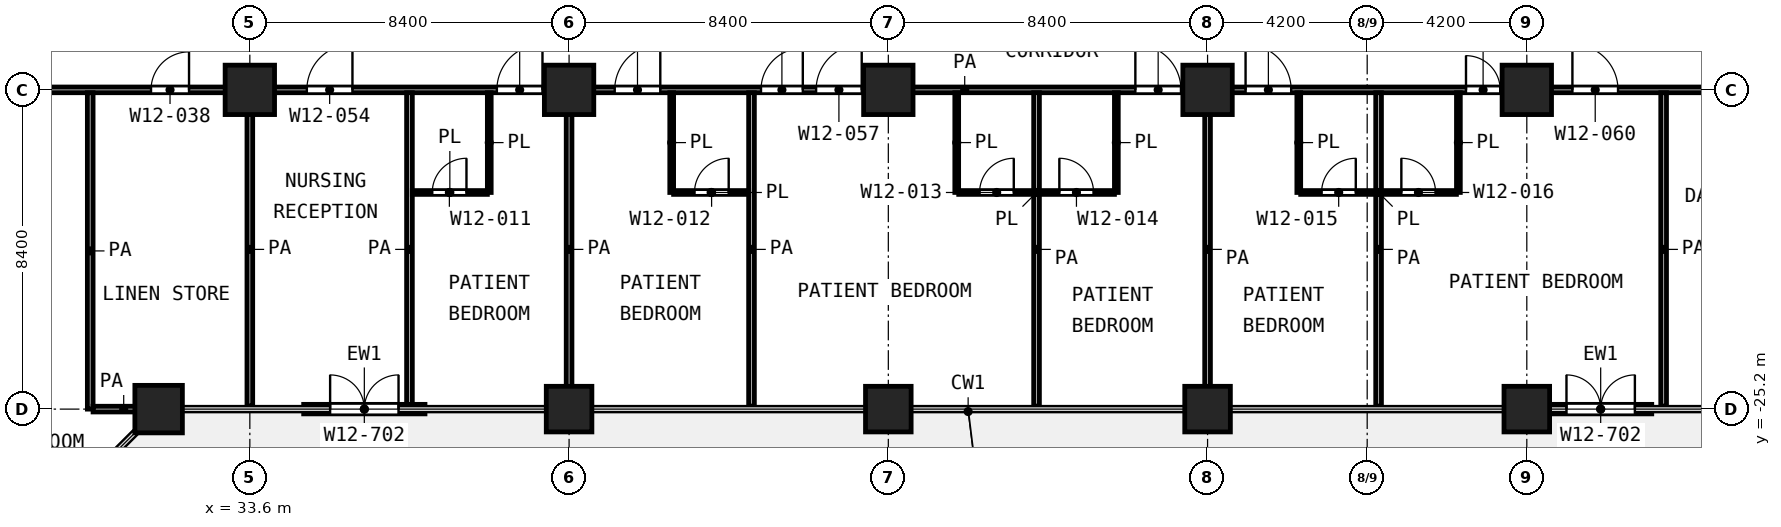
"""IFC4 building model, lengths in metres.
Left out: names, types, materials, properties, quantities, classifications, styles, units other than length and angle.
Written with IfcOpenShell. Run it as: python <this file> out.ifc"""

import sys

from ifc_helpers import new_model, si_unit, direction, frame, frame_2d, origin, origin_2d, place, context, subcontext, project, spatial, rectangle, extrude, element, fill, save


model = new_model("IFC4")
c1 = context("Model", 3, precision=1e-05, world=origin(), true_north=direction((0.0, 1.0)))
c2 = subcontext(c1, "Body", "Model", "MODEL_VIEW")
j1 = project(units=[si_unit("LENGTHUNIT", "METRE"), si_unit("PLANEANGLEUNIT", "RADIAN")], contexts=[c1])
p1 = place(None, origin())
s1 = spatial("IfcSite", under=j1, at=p1, CompositionType="ELEMENT")
p2 = place(p1, origin())
s2 = spatial("IfcBuilding", under=s1, at=p2, CompositionType="ELEMENT")
p3 = place(p2, frame((0.0, 0.0, 77.0)))
s3 = spatial("IfcBuildingStorey", under=s2, at=p3, CompositionType="ELEMENT", Elevation=77.0)
for number, where, z_axis, x_axis in (
    (1, (33.6, -16.8, 0.0), (0.0, 0.0, 1.0), (1.0, 0.0, 0.0)),
    (2, (42.0, -16.8, 0.0), (0.0, 0.0, 1.0), (1.0, 0.0, 0.0)),
    (3, (50.4, -16.8, 0.0), (0.0, 0.0, 1.0), (1.0, 0.0, 0.0)),
    (4, (58.8, -16.8, 0.0), (0.0, 0.0, 1.0), (1.0, 0.0, 0.0)),
    (5, (67.2, -16.8, 0.0), (0.0, 0.0, 1.0), (1.0, 0.0, 0.0)),
):
    element("IfcColumn", number, at=place(p3, frame(where, z_axis=z_axis, x_axis=x_axis)), inside=s3, PredefinedType="COLUMN", context=c2, shape_type="SweptSolid", body=[
        extrude(rectangle(XDim=1.3, YDim=1.3, at=origin_2d()), origin(), (0.0, 0.0, 1.0), 4.2),
    ])
p4 = place(p3, frame((31.2, -25.2, 0.0), z_axis=(0.0, 0.0, 1.0), x_axis=(1.0, 0.0, 0.0)))
e6 = element("IfcColumn", 6, at=p4, inside=s3, PredefinedType="COLUMN", context=c2, shape_type="SweptSolid", body=[
    extrude(rectangle(XDim=1.25, YDim=1.25, at=origin_2d()), origin(), (0.0, 0.0, 1.0), 4.2),
])
for number, where, z_axis, x_axis in (
    (7, (42.0, -25.2, 0.0), (0.0, 0.0, 1.0), (1.0, 0.0, 0.0)),
    (8, (50.4, -25.2, 0.0), (0.0, 0.0, 1.0), (1.0, 0.0, 0.0)),
    (9, (58.8, -25.2, 0.0), (0.0, 0.0, 1.0), (1.0, 0.0, 0.0)),
    (10, (67.2, -25.2, 0.0), (0.0, 0.0, 1.0), (1.0, 0.0, 0.0)),
):
    element("IfcColumn", number, at=place(p3, frame(where, z_axis=z_axis, x_axis=x_axis)), inside=s3, PredefinedType="COLUMN", context=c2, shape_type="SweptSolid", body=[
        extrude(rectangle(XDim=1.2, YDim=1.2, at=origin_2d()), origin(), (0.0, 0.0, 1.0), 4.2),
    ])
p5 = place(p3, frame((35.017, -25.2, 0.0), z_axis=(0.0, 0.0, 1.0), x_axis=(1.0, 0.0, 0.0)))
e11 = element("IfcWall", 11, at=p5, inside=s3, PredefinedType="SOLIDWALL", context=c2, shape_type="SweptSolid", body=[
    extrude(rectangle(XDim=3.192, YDim=0.25, at=frame_2d((1.596, 0.0))), origin(), (0.0, 0.0, 1.0), 3.78),
])
p6 = place(p5, frame((0.696, 0.0, 0.0)))
e12 = element("IfcOpeningElement", 12, at=p6, cuts=e11, PredefinedType="OPENING", context=c2, shape_type="SweptSolid", body=[
    extrude(rectangle(XDim=1.8, YDim=2.1, at=frame_2d((0.9, 1.05))), frame((0.0, 0.135, 0.0), z_axis=(0.0, -1.0, 0.0), x_axis=(1.0, 0.0, 0.0)), (0.0, 0.0, 1.0), 0.27),
])
p7 = place(p3, frame((67.8, -25.2, 0.0), z_axis=(0.0, 0.0, 1.0), x_axis=(1.0, 0.0, 0.0)))
e13 = element("IfcWall", 13, at=p7, inside=s3, PredefinedType="SOLIDWALL", context=c2, shape_type="SweptSolid", body=[
    extrude(rectangle(XDim=2.688, YDim=0.25, at=frame_2d((1.344, 0.0))), origin(), (0.0, 0.0, 1.0), 3.78),
])
p8 = place(p7, frame((0.444, 0.0, 0.0)))
e14 = element("IfcOpeningElement", 14, at=p8, cuts=e13, PredefinedType="OPENING", context=c2, shape_type="SweptSolid", body=[
    extrude(rectangle(XDim=1.8, YDim=2.1, at=frame_2d((0.9, 1.05))), frame((0.0, 0.135, 0.0), z_axis=(0.0, -1.0, 0.0), x_axis=(1.0, 0.0, 0.0)), (0.0, 0.0, 1.0), 0.27),
])
p9 = place(p3, frame((37.875, -19.5, 0.0), z_axis=(0.0, 0.0, 1.0), x_axis=(1.0, 0.0, 0.0)))
e15 = element("IfcWall", 15, at=p9, inside=s3, PredefinedType="PARTITIONING", context=c2, shape_type="SweptSolid", body=[
    extrude(rectangle(XDim=1.975, YDim=0.1, at=frame_2d((0.988, 0.0))), origin(), (0.0, 0.0, 1.0), 3.9),
])
p10 = place(p9, frame((0.525, 0.0, 0.0)))
e16 = element("IfcOpeningElement", 16, at=p10, cuts=e15, PredefinedType="OPENING", context=c2, shape_type="SweptSolid", body=[
    extrude(rectangle(XDim=0.9, YDim=2.1, at=frame_2d((0.45, 1.05))), frame((0.0, 0.06, 0.0), z_axis=(0.0, -1.0, 0.0), x_axis=(1.0, 0.0, 0.0)), (0.0, 0.0, 1.0), 0.12),
])
p11 = place(p3, frame((44.75, -19.5, 0.0), z_axis=(0.0, 0.0, 1.0), x_axis=(1.0, 0.0, 0.0)))
e17 = element("IfcWall", 17, at=p11, inside=s3, PredefinedType="PARTITIONING", context=c2, shape_type="SweptSolid", body=[
    extrude(rectangle(XDim=1.975, YDim=0.1, at=frame_2d((0.988, 0.0))), origin(), (0.0, 0.0, 1.0), 3.9),
])
p12 = place(p11, frame((0.55, 0.0, 0.0)))
e18 = element("IfcOpeningElement", 18, at=p12, cuts=e17, PredefinedType="OPENING", context=c2, shape_type="SweptSolid", body=[
    extrude(rectangle(XDim=0.9, YDim=2.1, at=frame_2d((0.45, 1.05))), frame((0.0, 0.06, 0.0), z_axis=(0.0, -1.0, 0.0), x_axis=(1.0, 0.0, 0.0)), (0.0, 0.0, 1.0), 0.12),
])
p13 = place(p3, frame((52.252, -19.5, 0.0), z_axis=(0.0, 0.0, 1.0), x_axis=(1.0, 0.0, 0.0)))
e19 = element("IfcWall", 19, at=p13, inside=s3, PredefinedType="PARTITIONING", context=c2, shape_type="SweptSolid", body=[
    extrude(rectangle(XDim=4.098, YDim=0.1, at=frame_2d((2.049, 0.0))), origin(), (0.0, 0.0, 1.0), 3.9),
])
p14 = place(p13, frame((0.549, 0.0, 0.0)))
e20 = element("IfcOpeningElement", 20, at=p14, cuts=e19, PredefinedType="OPENING", context=c2, shape_type="SweptSolid", body=[
    extrude(rectangle(XDim=0.9, YDim=2.1, at=frame_2d((0.45, 1.05))), frame((0.0, 0.06, 0.0), z_axis=(0.0, -1.0, 0.0), x_axis=(1.0, 0.0, 0.0)), (0.0, 0.0, 1.0), 0.12),
])
p15 = place(p13, frame((2.648, 0.0, 0.0)))
e21 = element("IfcOpeningElement", 21, at=p15, cuts=e19, PredefinedType="OPENING", context=c2, shape_type="SweptSolid", body=[
    extrude(rectangle(XDim=0.9, YDim=2.1, at=frame_2d((0.45, 1.05))), frame((0.0, 0.06, 0.0), z_axis=(0.0, -1.0, 0.0), x_axis=(1.0, 0.0, 0.0)), (0.0, 0.0, 1.0), 0.12),
])
p16 = place(p3, frame((61.25, -19.5, 0.0), z_axis=(0.0, 0.0, 1.0), x_axis=(1.0, 0.0, 0.0)))
e22 = element("IfcWall", 22, at=p16, inside=s3, PredefinedType="PARTITIONING", context=c2, shape_type="SweptSolid", body=[
    extrude(rectangle(XDim=4.098, YDim=0.1, at=frame_2d((2.049, 0.0))), origin(), (0.0, 0.0, 1.0), 3.9),
])
p17 = place(p16, frame((0.55, 0.0, 0.0)))
e23 = element("IfcOpeningElement", 23, at=p17, cuts=e22, PredefinedType="OPENING", context=c2, shape_type="SweptSolid", body=[
    extrude(rectangle(XDim=0.9, YDim=2.1, at=frame_2d((0.45, 1.05))), frame((0.0, 0.06, 0.0), z_axis=(0.0, -1.0, 0.0), x_axis=(1.0, 0.0, 0.0)), (0.0, 0.0, 1.0), 0.12),
])
p18 = place(p16, frame((2.649, 0.0, 0.0)))
e24 = element("IfcOpeningElement", 24, at=p18, cuts=e22, PredefinedType="OPENING", context=c2, shape_type="SweptSolid", body=[
    extrude(rectangle(XDim=0.9, YDim=2.1, at=frame_2d((0.45, 1.05))), frame((0.0, 0.06, 0.0), z_axis=(0.0, -1.0, 0.0), x_axis=(1.0, 0.0, 0.0)), (0.0, 0.0, 1.0), 0.12),
])
for number, where, z_axis, x_axis in (
    (25, (39.9, -19.5, 0.0), (0.0, 0.0, 1.0), (0.0, 1.0, 0.0)),
    (26, (44.7, -19.5, 0.0), (0.0, 0.0, 1.0), (0.0, 1.0, 0.0)),
):
    element("IfcWall", number, at=place(p3, frame(where, z_axis=z_axis, x_axis=x_axis)), inside=s3, PredefinedType="PARTITIONING", context=c2, shape_type="SweptSolid", body=[
        extrude(rectangle(XDim=2.625, YDim=0.1, at=frame_2d((1.312, 0.0))), origin(), (0.0, 0.0, 1.0), 3.9),
    ])
p19 = place(p3, frame((52.2, -19.499, 0.0), z_axis=(0.0, 0.0, 1.0), x_axis=(0.0, 1.0, 0.0)))
e27 = element("IfcWall", 27, at=p19, inside=s3, PredefinedType="PARTITIONING", context=c2, shape_type="SweptSolid", body=[
    extrude(rectangle(XDim=2.624, YDim=0.1, at=frame_2d((1.312, 0.0))), origin(), (0.0, 0.0, 1.0), 3.9),
])
for number, where, z_axis, x_axis in (
    (28, (56.4, -19.5, 0.0), (0.0, 0.0, 1.0), (0.0, 1.0, 0.0)),
    (29, (61.2, -19.5, 0.0), (0.0, 0.0, 1.0), (0.0, 1.0, 0.0)),
):
    element("IfcWall", number, at=place(p3, frame(where, z_axis=z_axis, x_axis=x_axis)), inside=s3, PredefinedType="PARTITIONING", context=c2, shape_type="SweptSolid", body=[
        extrude(rectangle(XDim=2.625, YDim=0.1, at=frame_2d((1.312, 0.0))), origin(), (0.0, 0.0, 1.0), 3.9),
    ])
p20 = place(p3, frame((65.4, -19.499, 0.0), z_axis=(0.0, 0.0, 1.0), x_axis=(0.0, 1.0, 0.0)))
e30 = element("IfcWall", 30, at=p20, inside=s3, PredefinedType="PARTITIONING", context=c2, shape_type="SweptSolid", body=[
    extrude(rectangle(XDim=2.624, YDim=0.1, at=frame_2d((1.312, 0.0))), origin(), (0.0, 0.0, 1.0), 3.9),
])
p21 = place(p3, frame((29.475, -25.2, 0.0), z_axis=(0.0, 0.0, 1.0), x_axis=(1.0, 0.0, 0.0)))
e31 = element("IfcWall", 31, at=p21, inside=s3, PredefinedType="PARTITIONING", context=c2, shape_type="SweptSolid", body=[
    extrude(rectangle(XDim=1.612, YDim=0.15, at=frame_2d((0.806, 0.0))), origin(), (0.0, 0.0, 1.0), 3.9),
])
p22 = place(p3, frame((25.1, -16.8, 0.0), z_axis=(0.0, 0.0, 1.0), x_axis=(1.0, 0.0, 0.0)))
e32 = element("IfcWall", 32, at=p22, inside=s3, PredefinedType="PARTITIONING", context=c2, shape_type="SweptSolid", body=[
    extrude(rectangle(XDim=54.62, YDim=0.15, at=frame_2d((27.31, 0.0))), origin(), (0.0, 0.0, 1.0), 3.9),
])
p23 = place(p22, frame((1.45, 0.0, 0.0)))
e33 = element("IfcOpeningElement", 33, at=p23, cuts=e32, PredefinedType="OPENING", context=c2, shape_type="SweptSolid", body=[
    extrude(rectangle(XDim=1.5, YDim=2.1, at=frame_2d((0.75, 1.05))), frame((0.0, 0.085, 0.0), z_axis=(0.0, -1.0, 0.0), x_axis=(1.0, 0.0, 0.0)), (0.0, 0.0, 1.0), 0.17),
])
p24 = place(p22, frame((5.9, 0.0, 0.0)))
e34 = element("IfcOpeningElement", 34, at=p24, cuts=e32, PredefinedType="OPENING", context=c2, shape_type="SweptSolid", body=[
    extrude(rectangle(XDim=1.0, YDim=2.1, at=frame_2d((0.5, 1.05))), frame((0.0, 0.085, 0.0), z_axis=(0.0, -1.0, 0.0), x_axis=(1.0, 0.0, 0.0)), (0.0, 0.0, 1.0), 0.17),
])
p25 = place(p22, frame((10.0, 0.0, 0.0)))
e35 = element("IfcOpeningElement", 35, at=p25, cuts=e32, PredefinedType="OPENING", context=c2, shape_type="SweptSolid", body=[
    extrude(rectangle(XDim=1.2, YDim=2.1, at=frame_2d((0.6, 1.05))), frame((0.0, 0.085, 0.0), z_axis=(0.0, -1.0, 0.0), x_axis=(1.0, 0.0, 0.0)), (0.0, 0.0, 1.0), 0.17),
])
p26 = place(p22, frame((15.0, 0.0, 0.0)))
e36 = element("IfcOpeningElement", 36, at=p26, cuts=e32, PredefinedType="OPENING", context=c2, shape_type="SweptSolid", body=[
    extrude(rectangle(XDim=1.2, YDim=2.1, at=frame_2d((0.6, 1.05))), frame((0.0, 0.085, 0.0), z_axis=(0.0, -1.0, 0.0), x_axis=(1.0, 0.0, 0.0)), (0.0, 0.0, 1.0), 0.17),
])
p27 = place(p22, frame((18.1, 0.0, 0.0)))
e37 = element("IfcOpeningElement", 37, at=p27, cuts=e32, PredefinedType="OPENING", context=c2, shape_type="SweptSolid", body=[
    extrude(rectangle(XDim=1.2, YDim=2.1, at=frame_2d((0.6, 1.05))), frame((0.0, 0.085, 0.0), z_axis=(0.0, -1.0, 0.0), x_axis=(1.0, 0.0, 0.0)), (0.0, 0.0, 1.0), 0.17),
])
p28 = place(p22, frame((23.4, 0.0, 0.0)))
e38 = element("IfcOpeningElement", 38, at=p28, cuts=e32, PredefinedType="OPENING", context=c2, shape_type="SweptSolid", body=[
    extrude(rectangle(XDim=1.2, YDim=2.1, at=frame_2d((0.6, 1.05))), frame((0.0, 0.085, 0.0), z_axis=(0.0, -1.0, 0.0), x_axis=(1.0, 0.0, 0.0)), (0.0, 0.0, 1.0), 0.17),
])
p29 = place(p22, frame((21.95, 0.0, 0.0)))
e39 = element("IfcOpeningElement", 39, at=p29, cuts=e32, PredefinedType="OPENING", context=c2, shape_type="SweptSolid", body=[
    extrude(rectangle(XDim=1.1, YDim=2.1, at=frame_2d((0.55, 1.05))), frame((0.0, 0.085, 0.0), z_axis=(0.0, -1.0, 0.0), x_axis=(1.0, 0.0, 0.0)), (0.0, 0.0, 1.0), 0.17),
])
p30 = place(p22, frame((31.8, 0.0, 0.0)))
e40 = element("IfcOpeningElement", 40, at=p30, cuts=e32, PredefinedType="OPENING", context=c2, shape_type="SweptSolid", body=[
    extrude(rectangle(XDim=1.2, YDim=2.1, at=frame_2d((0.6, 1.05))), frame((0.0, 0.085, 0.0), z_axis=(0.0, -1.0, 0.0), x_axis=(1.0, 0.0, 0.0)), (0.0, 0.0, 1.0), 0.17),
])
p31 = place(p22, frame((34.7, 0.0, 0.0)))
e41 = element("IfcOpeningElement", 41, at=p31, cuts=e32, PredefinedType="OPENING", context=c2, shape_type="SweptSolid", body=[
    extrude(rectangle(XDim=1.2, YDim=2.1, at=frame_2d((0.6, 1.05))), frame((0.0, 0.085, 0.0), z_axis=(0.0, -1.0, 0.0), x_axis=(1.0, 0.0, 0.0)), (0.0, 0.0, 1.0), 0.17),
])
p32 = place(p22, frame((43.3, 0.0, 0.0)))
e42 = element("IfcOpeningElement", 42, at=p32, cuts=e32, PredefinedType="OPENING", context=c2, shape_type="SweptSolid", body=[
    extrude(rectangle(XDim=1.2, YDim=2.1, at=frame_2d((0.6, 1.05))), frame((0.0, 0.085, 0.0), z_axis=(0.0, -1.0, 0.0), x_axis=(1.0, 0.0, 0.0)), (0.0, 0.0, 1.0), 0.17),
])
p33 = place(p22, frame((40.5, 0.0, 0.0)))
e43 = element("IfcOpeningElement", 43, at=p33, cuts=e32, PredefinedType="OPENING", context=c2, shape_type="SweptSolid", body=[
    extrude(rectangle(XDim=0.9, YDim=2.1, at=frame_2d((0.45, 1.05))), frame((0.0, 0.085, 0.0), z_axis=(0.0, -1.0, 0.0), x_axis=(1.0, 0.0, 0.0)), (0.0, 0.0, 1.0), 0.17),
])
p34 = place(p22, frame((48.25, 0.0, 0.0)))
e44 = element("IfcOpeningElement", 44, at=p34, cuts=e32, PredefinedType="OPENING", context=c2, shape_type="SweptSolid", body=[
    extrude(rectangle(XDim=1.5, YDim=2.1, at=frame_2d((0.75, 1.05))), frame((0.0, 0.085, 0.0), z_axis=(0.0, -1.0, 0.0), x_axis=(1.0, 0.0, 0.0)), (0.0, 0.0, 1.0), 0.17),
])
p35 = place(p3, frame((29.4, -25.2, 0.0), z_axis=(0.0, 0.0, 1.0), x_axis=(0.0, 1.0, 0.0)))
e45 = element("IfcWall", 45, at=p35, inside=s3, PredefinedType="PARTITIONING", context=c2, shape_type="SweptSolid", body=[
    extrude(rectangle(XDim=8.325, YDim=0.15, at=frame_2d((4.163, 0.0))), origin(), (0.0, 0.0, 1.0), 3.9),
])
for number, where, z_axis, x_axis in (
    (46, (33.6, -25.12, 0.0), (0.0, 0.0, 1.0), (0.0, 1.0, 0.0)),
    (47, (37.8, -25.12, 0.0), (0.0, 0.0, 1.0), (0.0, 1.0, 0.0)),
    (48, (42.0, -25.12, 0.0), (0.0, 0.0, 1.0), (0.0, 1.0, 0.0)),
    (49, (46.8, -25.12, 0.0), (0.0, 0.0, 1.0), (0.0, 1.0, 0.0)),
    (50, (54.3, -25.12, 0.0), (0.0, 0.0, 1.0), (0.0, 1.0, 0.0)),
    (51, (58.8, -25.12, 0.0), (0.0, 0.0, 1.0), (0.0, 1.0, 0.0)),
    (52, (63.3, -25.12, 0.0), (0.0, 0.0, 1.0), (0.0, 1.0, 0.0)),
    (53, (70.8, -25.12, 0.0), (0.0, 0.0, 1.0), (0.0, 1.0, 0.0)),
):
    element("IfcWall", number, at=place(p3, frame(where, z_axis=z_axis, x_axis=x_axis)), inside=s3, PredefinedType="PARTITIONING", context=c2, shape_type="SweptSolid", body=[
        extrude(rectangle(XDim=8.245, YDim=0.15, at=frame_2d((4.123, 0.0))), origin(), (0.0, 0.0, 1.0), 3.9),
    ])
p36 = place(p6, origin())
e54 = element("IfcDoor", 54, at=p36, inside=s3, OperationType="DOUBLE_DOOR_SINGLE_SWING", PredefinedType="DOOR", context=c2, shape_type="SweptSolid", body=[
    extrude(rectangle(XDim=1.8, YDim=2.1, at=frame_2d((0.9, 1.05))), frame((0.0, 0.025, 0.0), z_axis=(0.0, -1.0, 0.0), x_axis=(1.0, 0.0, 0.0)), (0.0, 0.0, 1.0), 0.05),
])
fill(e12, e54)
p37 = place(p8, origin())
e55 = element("IfcDoor", 55, at=p37, inside=s3, OperationType="DOUBLE_DOOR_SINGLE_SWING", PredefinedType="DOOR", context=c2, shape_type="SweptSolid", body=[
    extrude(rectangle(XDim=1.8, YDim=2.1, at=frame_2d((0.9, 1.05))), frame((0.0, 0.025, 0.0), z_axis=(0.0, -1.0, 0.0), x_axis=(1.0, 0.0, 0.0)), (0.0, 0.0, 1.0), 0.05),
])
fill(e14, e55)
p38 = place(p24, origin())
e56 = element("IfcDoor", 56, at=p38, inside=s3, OperationType="SINGLE_SWING_RIGHT", PredefinedType="DOOR", context=c2, shape_type="SweptSolid", body=[
    extrude(rectangle(XDim=1.0, YDim=2.1, at=frame_2d((0.5, 1.05))), frame((0.0, 0.025, 0.0), z_axis=(0.0, -1.0, 0.0), x_axis=(1.0, 0.0, 0.0)), (0.0, 0.0, 1.0), 0.05),
])
fill(e34, e56)
p39 = place(p25, origin())
e57 = element("IfcDoor", 57, at=p39, inside=s3, OperationType="SINGLE_SWING_RIGHT", PredefinedType="DOOR", context=c2, shape_type="SweptSolid", body=[
    extrude(rectangle(XDim=1.2, YDim=2.1, at=frame_2d((0.6, 1.05))), frame((0.0, 0.025, 0.0), z_axis=(0.0, -1.0, 0.0), x_axis=(1.0, 0.0, 0.0)), (0.0, 0.0, 1.0), 0.05),
])
fill(e35, e57)
p40 = place(p26, origin())
e58 = element("IfcDoor", 58, at=p40, inside=s3, OperationType="SINGLE_SWING_RIGHT", PredefinedType="DOOR", context=c2, shape_type="SweptSolid", body=[
    extrude(rectangle(XDim=1.2, YDim=2.1, at=frame_2d((0.6, 1.05))), frame((0.0, 0.025, 0.0), z_axis=(0.0, -1.0, 0.0), x_axis=(1.0, 0.0, 0.0)), (0.0, 0.0, 1.0), 0.05),
])
fill(e36, e58)
p41 = place(p10, origin())
e59 = element("IfcDoor", 59, at=p41, inside=s3, OperationType="SINGLE_SWING_RIGHT", PredefinedType="DOOR", context=c2, shape_type="SweptSolid", body=[
    extrude(rectangle(XDim=0.9, YDim=2.1, at=frame_2d((0.45, 1.05))), frame((0.0, 0.025, 0.0), z_axis=(0.0, -1.0, 0.0), x_axis=(1.0, 0.0, 0.0)), (0.0, 0.0, 1.0), 0.05),
])
fill(e16, e59)
p42 = place(p27, origin())
e60 = element("IfcDoor", 60, at=p42, inside=s3, OperationType="SINGLE_SWING_RIGHT", PredefinedType="DOOR", context=c2, shape_type="SweptSolid", body=[
    extrude(rectangle(XDim=1.2, YDim=2.1, at=frame_2d((0.6, 1.05))), frame((0.0, 0.025, 0.0), z_axis=(0.0, -1.0, 0.0), x_axis=(1.0, 0.0, 0.0)), (0.0, 0.0, 1.0), 0.05),
])
fill(e37, e60)
p43 = place(p12, origin())
e61 = element("IfcDoor", 61, at=p43, inside=s3, OperationType="SINGLE_SWING_RIGHT", PredefinedType="DOOR", context=c2, shape_type="SweptSolid", body=[
    extrude(rectangle(XDim=0.9, YDim=2.1, at=frame_2d((0.45, 1.05))), frame((0.0, 0.025, 0.0), z_axis=(0.0, -1.0, 0.0), x_axis=(1.0, 0.0, 0.0)), (0.0, 0.0, 1.0), 0.05),
])
fill(e18, e61)
p44 = place(p28, origin())
e62 = element("IfcDoor", 62, at=p44, inside=s3, OperationType="SINGLE_SWING_RIGHT", PredefinedType="DOOR", context=c2, shape_type="SweptSolid", body=[
    extrude(rectangle(XDim=1.2, YDim=2.1, at=frame_2d((0.6, 1.05))), frame((0.0, 0.025, 0.0), z_axis=(0.0, -1.0, 0.0), x_axis=(1.0, 0.0, 0.0)), (0.0, 0.0, 1.0), 0.05),
])
fill(e38, e62)
p45 = place(p29, origin())
e63 = element("IfcDoor", 63, at=p45, inside=s3, OperationType="SINGLE_SWING_RIGHT", PredefinedType="DOOR", context=c2, shape_type="SweptSolid", body=[
    extrude(rectangle(XDim=1.1, YDim=2.1, at=frame_2d((0.55, 1.05))), frame((0.0, 0.025, 0.0), z_axis=(0.0, -1.0, 0.0), x_axis=(1.0, 0.0, 0.0)), (0.0, 0.0, 1.0), 0.05),
])
fill(e39, e63)
p46 = place(p14, origin())
e64 = element("IfcDoor", 64, at=p46, inside=s3, OperationType="SINGLE_SWING_RIGHT", PredefinedType="DOOR", context=c2, shape_type="SweptSolid", body=[
    extrude(rectangle(XDim=0.9, YDim=2.1, at=frame_2d((0.45, 1.05))), frame((0.0, 0.025, 0.0), z_axis=(0.0, -1.0, 0.0), x_axis=(1.0, 0.0, 0.0)), (0.0, 0.0, 1.0), 0.05),
])
fill(e20, e64)
p47 = place(p30, origin())
e65 = element("IfcDoor", 65, at=p47, inside=s3, OperationType="SINGLE_SWING_LEFT", PredefinedType="DOOR", context=c2, shape_type="SweptSolid", body=[
    extrude(rectangle(XDim=1.2, YDim=2.1, at=frame_2d((0.6, 1.05))), frame((0.0, 0.025, 0.0), z_axis=(0.0, -1.0, 0.0), x_axis=(1.0, 0.0, 0.0)), (0.0, 0.0, 1.0), 0.05),
])
fill(e40, e65)
p48 = place(p15, origin())
e66 = element("IfcDoor", 66, at=p48, inside=s3, OperationType="SINGLE_SWING_LEFT", PredefinedType="DOOR", context=c2, shape_type="SweptSolid", body=[
    extrude(rectangle(XDim=0.9, YDim=2.1, at=frame_2d((0.45, 1.05))), frame((0.0, 0.025, 0.0), z_axis=(0.0, -1.0, 0.0), x_axis=(1.0, 0.0, 0.0)), (0.0, 0.0, 1.0), 0.05),
])
fill(e21, e66)
p49 = place(p31, origin())
e67 = element("IfcDoor", 67, at=p49, inside=s3, OperationType="SINGLE_SWING_LEFT", PredefinedType="DOOR", context=c2, shape_type="SweptSolid", body=[
    extrude(rectangle(XDim=1.2, YDim=2.1, at=frame_2d((0.6, 1.05))), frame((0.0, 0.025, 0.0), z_axis=(0.0, -1.0, 0.0), x_axis=(1.0, 0.0, 0.0)), (0.0, 0.0, 1.0), 0.05),
])
fill(e41, e67)
p50 = place(p17, origin())
e68 = element("IfcDoor", 68, at=p50, inside=s3, OperationType="SINGLE_SWING_RIGHT", PredefinedType="DOOR", context=c2, shape_type="SweptSolid", body=[
    extrude(rectangle(XDim=0.9, YDim=2.1, at=frame_2d((0.45, 1.05))), frame((0.0, 0.025, 0.0), z_axis=(0.0, -1.0, 0.0), x_axis=(1.0, 0.0, 0.0)), (0.0, 0.0, 1.0), 0.05),
])
fill(e23, e68)
p51 = place(p32, origin())
e69 = element("IfcDoor", 69, at=p51, inside=s3, OperationType="SINGLE_SWING_LEFT", PredefinedType="DOOR", context=c2, shape_type="SweptSolid", body=[
    extrude(rectangle(XDim=1.2, YDim=2.1, at=frame_2d((0.6, 1.05))), frame((0.0, 0.025, 0.0), z_axis=(0.0, -1.0, 0.0), x_axis=(1.0, 0.0, 0.0)), (0.0, 0.0, 1.0), 0.05),
])
fill(e42, e69)
p52 = place(p33, origin())
e70 = element("IfcDoor", 70, at=p52, inside=s3, OperationType="SINGLE_SWING_LEFT", PredefinedType="DOOR", context=c2, shape_type="SweptSolid", body=[
    extrude(rectangle(XDim=0.9, YDim=2.1, at=frame_2d((0.45, 1.05))), frame((0.0, 0.025, 0.0), z_axis=(0.0, -1.0, 0.0), x_axis=(1.0, 0.0, 0.0)), (0.0, 0.0, 1.0), 0.05),
])
fill(e43, e70)
p53 = place(p18, origin())
e71 = element("IfcDoor", 71, at=p53, inside=s3, OperationType="SINGLE_SWING_LEFT", PredefinedType="DOOR", context=c2, shape_type="SweptSolid", body=[
    extrude(rectangle(XDim=0.9, YDim=2.1, at=frame_2d((0.45, 1.05))), frame((0.0, 0.025, 0.0), z_axis=(0.0, -1.0, 0.0), x_axis=(1.0, 0.0, 0.0)), (0.0, 0.0, 1.0), 0.05),
])
fill(e24, e71)
save(model, sys.argv[1])
